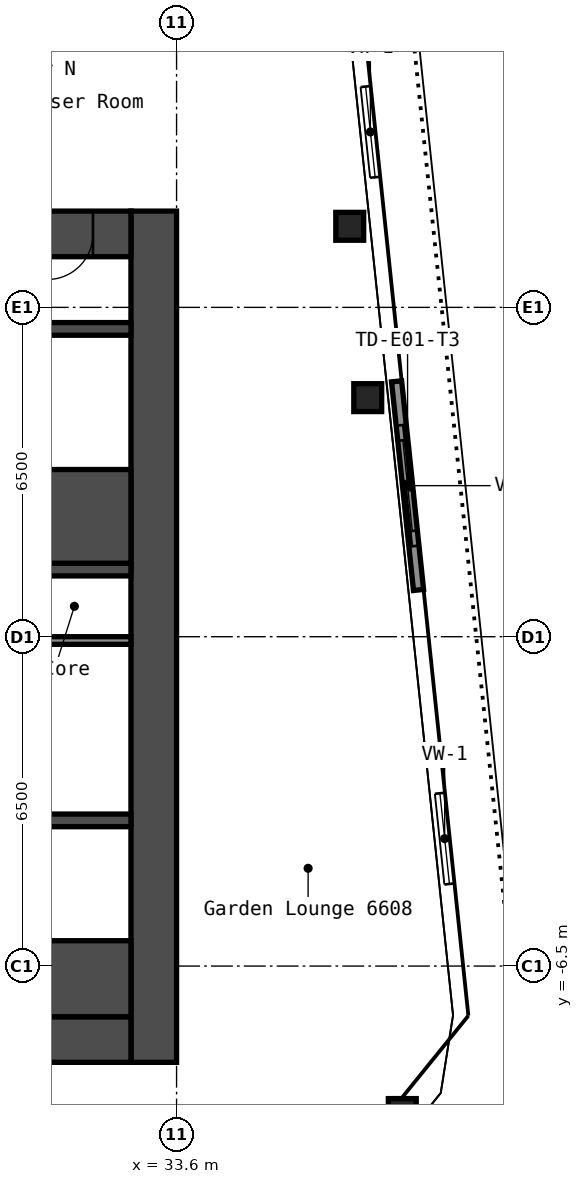
"""IFC4 building model, lengths in metres.
Left out: names, types, materials, properties, quantities, classifications, styles, units other than length and angle.
Written with IfcOpenShell. Run it as: python <this file> out.ifc"""

import sys

from ifc_helpers import new_model, si_unit, direction, frame, frame_2d, origin, origin_2d, place, context, subcontext, project, spatial, rectangle, hollow_rectangle, extrude, element, fill, save


model = new_model("IFC4")
c1 = context("Model", 3, precision=1e-05, world=origin(), true_north=direction((0.0, 1.0)))
c2 = subcontext(c1, "Body", "Model", "MODEL_VIEW")
j1 = project(units=[si_unit("LENGTHUNIT", "METRE"), si_unit("PLANEANGLEUNIT", "RADIAN")], contexts=[c1])
p1 = place(None, origin())
s1 = spatial("IfcSite", under=j1, at=p1, CompositionType="ELEMENT")
p2 = place(p1, origin())
s2 = spatial("IfcBuilding", under=s1, at=p2, CompositionType="ELEMENT")
p3 = place(p2, frame((0.0, 0.0, 232.6)))
s3 = spatial("IfcBuildingStorey", under=s2, at=p3, CompositionType="ELEMENT", Elevation=232.6)
for number, where, z_axis, x_axis in (
    (1, (38.054, -9.39, 0.0), (0.0, 0.0, 1.0), (1.0, 0.0, 0.0)),
    (2, (37.373, 4.719, 0.0), (0.0, 0.0, 1.0), (1.0, 0.0, 0.0)),
    (3, (37.017, 8.1, 0.0), (0.0, 0.0, 1.0), (1.0, 0.0, 0.0)),
):
    element("IfcColumn", number, at=place(p3, frame(where, z_axis=z_axis, x_axis=x_axis)), inside=s3, PredefinedType="COLUMN", context=c2, shape_type="SweptSolid", body=[
        extrude(hollow_rectangle(XDim=0.55, YDim=0.55, WallThickness=0.022, InnerFilletRadius=0.033, OuterFilletRadius=0.055, at=origin_2d()), origin(), (0.0, 0.0, 1.0), 5.95),
    ])
p4 = place(p3, frame((33.15, -8.4, 0.0), z_axis=(0.0, 0.0, 1.0), x_axis=(0.0, 1.0, 0.0)))
e4 = element("IfcWall", 4, at=p4, inside=s3, PredefinedType="SHEAR", context=c2, shape_type="SweptSolid", body=[
    extrude(rectangle(XDim=16.8, YDim=0.9, at=frame_2d((8.4, 0.0))), origin(), (0.0, 0.0, 1.0), 5.95),
])
p5 = place(p3, frame((17.7, 7.95, 0.0), z_axis=(0.0, 0.0, 1.0), x_axis=(1.0, 0.0, 0.0)))
e5 = element("IfcWall", 5, at=p5, inside=s3, PredefinedType="SHEAR", context=c2, shape_type="SweptSolid", body=[
    extrude(rectangle(XDim=15.0, YDim=0.9, at=frame_2d((7.5, 0.0))), origin(), (0.0, 0.0, 1.0), 5.95),
])
p6 = place(p5, frame((10.4, 0.0, 0.0)))
e6 = element("IfcOpeningElement", 6, at=p6, cuts=e5, PredefinedType="OPENING", context=c2, shape_type="SweptSolid", body=[
    extrude(rectangle(XDim=1.2, YDim=2.1, at=frame_2d((0.6, 1.05))), frame((0.0, 0.46, 0.0), z_axis=(0.0, -1.0, 0.0), x_axis=(1.0, 0.0, 0.0)), (0.0, 0.0, 1.0), 0.92),
])
p7 = place(p5, frame((13.35, 0.0, 0.0)))
e7 = element("IfcOpeningElement", 7, at=p7, cuts=e5, PredefinedType="OPENING", context=c2, shape_type="SweptSolid", body=[
    extrude(rectangle(XDim=0.9, YDim=2.1, at=frame_2d((0.45, 1.05))), frame((0.0, 0.46, 0.0), z_axis=(0.0, -1.0, 0.0), x_axis=(1.0, 0.0, 0.0)), (0.0, 0.0, 1.0), 0.92),
])
p8 = place(p3, frame((17.7, -7.95, 0.0), z_axis=(0.0, 0.0, 1.0), x_axis=(1.0, 0.0, 0.0)))
e8 = element("IfcWall", 8, at=p8, inside=s3, PredefinedType="SHEAR", context=c2, shape_type="SweptSolid", body=[
    extrude(rectangle(XDim=15.0, YDim=0.9, at=frame_2d((7.5, 0.0))), origin(), (0.0, 0.0, 1.0), 5.95),
])
p9 = place(p8, frame((2.55, 0.0, 0.0)))
e9 = element("IfcOpeningElement", 9, at=p9, cuts=e8, PredefinedType="OPENING", context=c2, shape_type="SweptSolid", body=[
    extrude(rectangle(XDim=1.0, YDim=2.1, at=frame_2d((0.5, 1.05))), frame((0.0, 0.46, 0.0), z_axis=(0.0, -1.0, 0.0), x_axis=(1.0, 0.0, 0.0)), (0.0, 0.0, 1.0), 0.92),
])
p10 = place(p3, frame((27.65, 1.325, 0.0), z_axis=(0.0, 0.0, 1.0), x_axis=(1.0, 0.0, 0.0)))
e10 = element("IfcWall", 10, at=p10, inside=s3, PredefinedType="SHEAR", context=c2, shape_type="SweptSolid", body=[
    extrude(rectangle(XDim=5.05, YDim=0.25, at=frame_2d((2.525, 0.0))), origin(), (0.0, 0.0, 1.0), 5.95),
])
p11 = place(p10, frame((0.55, 0.0, 0.0)))
e11 = element("IfcOpeningElement", 11, at=p11, cuts=e10, PredefinedType="OPENING", context=c2, shape_type="SweptSolid", body=[
    extrude(rectangle(XDim=1.2, YDim=2.1, at=frame_2d((0.6, 1.05))), frame((0.0, 0.135, 0.0), z_axis=(0.0, -1.0, 0.0), x_axis=(1.0, 0.0, 0.0)), (0.0, 0.0, 1.0), 0.27),
])
p12 = place(p3, frame((30.3, 2.375, 0.0), z_axis=(0.0, 0.0, 1.0), x_axis=(1.0, 0.0, 0.0)))
e12 = element("IfcWall", 12, at=p12, inside=s3, PredefinedType="SHEAR", context=c2, shape_type="SweptSolid", body=[
    extrude(rectangle(XDim=2.4, YDim=1.85, at=frame_2d((1.2, 0.0))), origin(), (0.0, 0.0, 1.0), 5.95),
])
p13 = place(p3, frame((30.3, 6.075, 0.0), z_axis=(0.0, 0.0, 1.0), x_axis=(1.0, 0.0, 0.0)))
e13 = element("IfcWall", 13, at=p13, inside=s3, PredefinedType="SHEAR", context=c2, shape_type="SweptSolid", body=[
    extrude(rectangle(XDim=2.4, YDim=0.25, at=frame_2d((1.2, 0.0))), origin(), (0.0, 0.0, 1.0), 5.95),
])
p14 = place(p3, frame((28.15, -3.625, 0.0), z_axis=(0.0, 0.0, 1.0), x_axis=(1.0, 0.0, 0.0)))
e14 = element("IfcWall", 14, at=p14, inside=s3, PredefinedType="SHEAR", context=c2, shape_type="SweptSolid", body=[
    extrude(rectangle(XDim=4.55, YDim=0.25, at=frame_2d((2.275, 0.0))), origin(), (0.0, 0.0, 1.0), 5.95),
])
p15 = place(p3, frame((28.15, -6.75, 0.0), z_axis=(0.0, 0.0, 1.0), x_axis=(1.0, 0.0, 0.0)))
e15 = element("IfcWall", 15, at=p15, inside=s3, PredefinedType="SHEAR", context=c2, shape_type="SweptSolid", body=[
    extrude(rectangle(XDim=4.55, YDim=1.5, at=frame_2d((2.275, 0.0))), origin(), (0.0, 0.0, 1.0), 5.95),
])
p16 = place(p3, frame((29.7, -0.075, 0.0), z_axis=(0.0, 0.0, 1.0), x_axis=(1.0, 0.0, 0.0)))
e16 = element("IfcWall", 16, at=p16, inside=s3, PredefinedType="PARTITIONING", context=c2, shape_type="SweptSolid", body=[
    extrude(rectangle(XDim=3.0, YDim=0.15, at=frame_2d((1.5, 0.0))), origin(), (0.0, 0.0, 1.0), 5.95),
])
p17 = place(p3, frame((16.048, 10.533, 0.0), z_axis=(0.0, 0.0, 1.0), x_axis=(0.994522460242, 0.104523088709, 0.0)))
e17 = element("IfcWall", 17, at=p17, inside=s3, PredefinedType="PARTITIONING", context=c2, shape_type="SweptSolid", body=[
    extrude(rectangle(XDim=21.3, YDim=0.2, at=frame_2d((10.65, 0.0))), origin(), (0.0, 0.0, 1.0), 5.95),
])
p18 = place(p17, frame((4.2, 0.0, 0.0)))
e18 = element("IfcOpeningElement", 18, at=p18, cuts=e17, PredefinedType="OPENING", context=c2, shape_type="SweptSolid", body=[
    extrude(rectangle(XDim=1.6, YDim=2.1, at=frame_2d((0.8, 1.05))), frame((0.0, 0.11, 0.0), z_axis=(0.0, -1.0, 0.0), x_axis=(1.0, 0.0, 0.0)), (0.0, 0.0, 1.0), 0.22),
])
p19 = place(p17, frame((18.45, 0.0, 0.0)))
e19 = element("IfcOpeningElement", 19, at=p19, cuts=e17, PredefinedType="OPENING", context=c2, shape_type="SweptSolid", body=[
    extrude(rectangle(XDim=0.9, YDim=2.1, at=frame_2d((0.45, 1.05))), frame((0.0, 0.11, 0.0), z_axis=(0.0, -1.0, 0.0), x_axis=(1.0, 0.0, 0.0)), (0.0, 0.0, 1.0), 0.22),
])
p20 = place(p3, frame((39.256, -7.461, 4.45), z_axis=(0.0, 0.0, 1.0), x_axis=(-0.104506598742, 0.994524193179, 0.0)))
p21 = place(p20, frame((2.595, 0.0, 0.25)))
p22 = place(p21, origin())
e20 = element("IfcWindow", 20, at=p22, inside=s3, PartitioningType="SINGLE_PANEL", PredefinedType="WINDOW", context=c2, shape_type="SweptSolid", body=[
    extrude(rectangle(XDim=1.8, YDim=0.9, at=frame_2d((0.9, 0.45))), frame((0.0, 0.03, 0.0), z_axis=(0.0, -1.0, 0.0), x_axis=(1.0, 0.0, 0.0)), (0.0, 0.0, 1.0), 0.06),
])
p23 = place(p3, frame((38.526, -0.509, 4.45), z_axis=(0.0, 0.0, 1.0), x_axis=(-0.104543574031, 0.994520307047, 0.0)))
p24 = place(p23, frame((2.61, 0.0, 0.25)))
p25 = place(p24, origin())
e21 = element("IfcWindow", 21, at=p25, inside=s3, PartitioningType="SINGLE_PANEL", PredefinedType="WINDOW", context=c2, shape_type="SweptSolid", body=[
    extrude(rectangle(XDim=1.8, YDim=0.9, at=frame_2d((0.9, 0.45))), frame((0.0, 0.03, 0.0), z_axis=(0.0, -1.0, 0.0), x_axis=(1.0, 0.0, 0.0)), (0.0, 0.0, 1.0), 0.06),
])
p26 = place(p3, frame((37.792, 6.472, 4.45), z_axis=(0.0, 0.0, 1.0), x_axis=(-0.104512790532, 0.994523542514, 0.0)))
p27 = place(p26, frame((2.61, 0.0, 0.25)))
p28 = place(p27, origin())
e22 = element("IfcWindow", 22, at=p28, inside=s3, PartitioningType="SINGLE_PANEL", PredefinedType="WINDOW", context=c2, shape_type="SweptSolid", body=[
    extrude(rectangle(XDim=1.8, YDim=0.9, at=frame_2d((0.9, 0.45))), frame((0.0, 0.03, 0.0), z_axis=(0.0, -1.0, 0.0), x_axis=(1.0, 0.0, 0.0)), (0.0, 0.0, 1.0), 0.06),
])
p29 = place(p3, frame((38.375, 0.923, 0.0), z_axis=(0.0, 0.0, 1.0), x_axis=(-0.10450059231, 0.994524824329, 0.0)))
p30 = place(p29, frame((0.87, 0.0, 0.0)))
p31 = place(p30, frame((2.4, 0.0, 0.0), z_axis=(0.0, 0.0, 1.0), x_axis=(-1.0, 0.0, 0.0)))
e23 = element("IfcDoor", 23, at=p31, inside=s3, OperationType="SLIDING_TO_LEFT", PredefinedType="DOOR", context=c2, shape_type="SweptSolid", body=[
    extrude(rectangle(XDim=2.4, YDim=2.2, at=frame_2d((1.2, 1.1))), frame((0.0, 0.025, 0.0), z_axis=(0.0, -1.0, 0.0), x_axis=(1.0, 0.0, 0.0)), (0.0, 0.0, 1.0), 0.05),
])
p32 = place(p7, origin())
e24 = element("IfcDoor", 24, at=p32, inside=s3, OperationType="SINGLE_SWING_LEFT", PredefinedType="DOOR", context=c2, shape_type="SweptSolid", body=[
    extrude(rectangle(XDim=0.9, YDim=2.1, at=frame_2d((0.45, 1.05))), frame((0.0, 0.025, 0.0), z_axis=(0.0, -1.0, 0.0), x_axis=(1.0, 0.0, 0.0)), (0.0, 0.0, 1.0), 0.05),
])
fill(e7, e24)
save(model, sys.argv[1])
